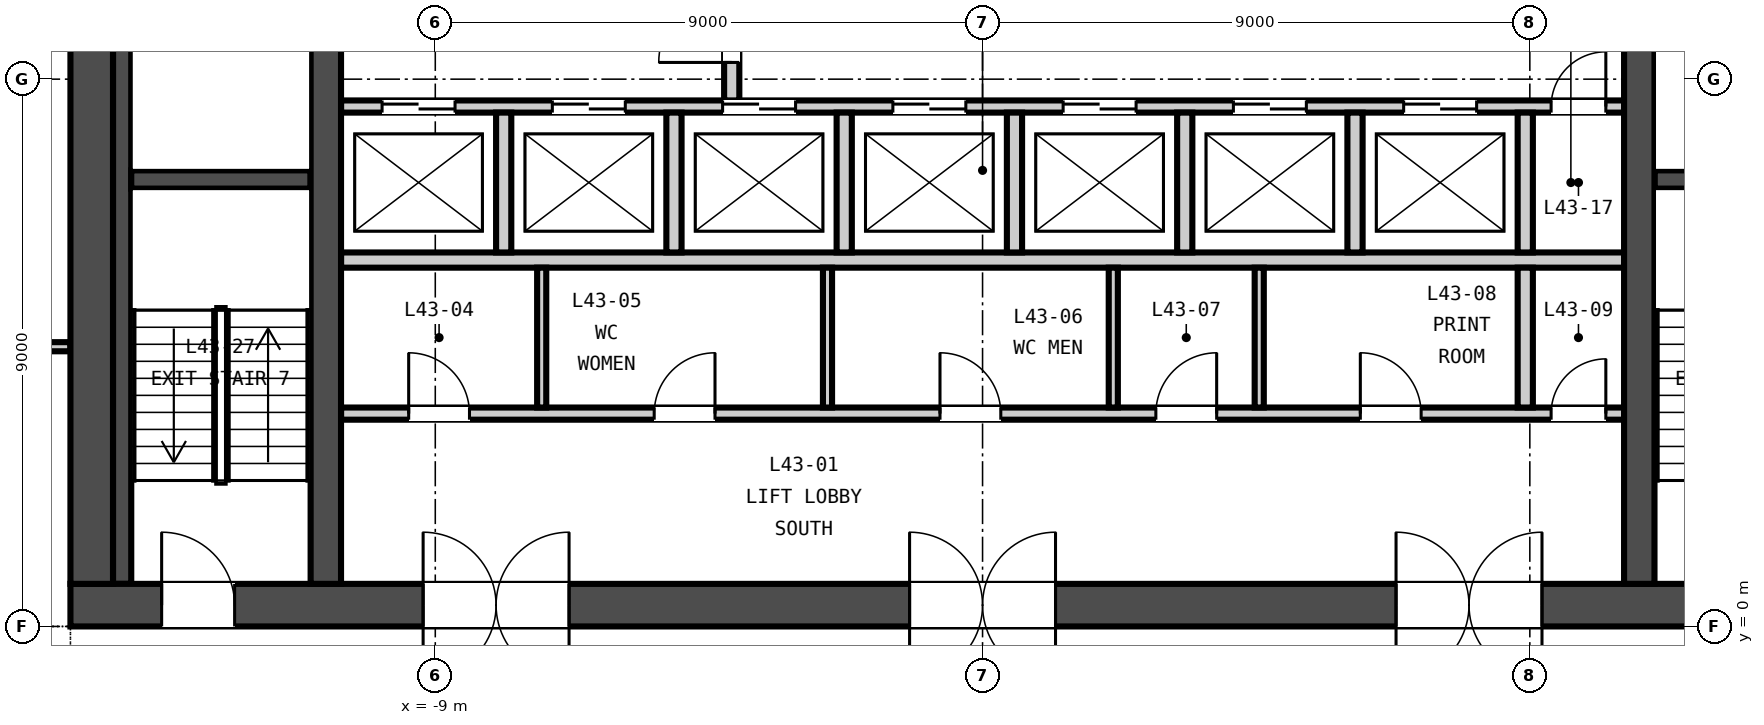
"""IFC4 building model, lengths in metres.
Left out: names, types, materials, properties, quantities, classifications, styles, units other than length and angle.
Written with IfcOpenShell. Run it as: python <this file> out.ifc"""

import sys

from ifc_helpers import new_model, si_unit, direction, frame, frame_2d, origin, place, context, subcontext, project, spatial, rectangle, extrude, element, fill, save


model = new_model("IFC4")
c1 = context("Model", 3, precision=1e-05, world=origin(), true_north=direction((0.0, 1.0)))
c2 = subcontext(c1, "Body", "Model", "MODEL_VIEW")
j1 = project(units=[si_unit("LENGTHUNIT", "METRE"), si_unit("PLANEANGLEUNIT", "RADIAN")], contexts=[c1])
p1 = place(None, origin())
s1 = spatial("IfcSite", under=j1, at=p1, CompositionType="ELEMENT")
p2 = place(p1, origin())
s2 = spatial("IfcBuilding", under=s1, at=p2, CompositionType="ELEMENT")
p3 = place(p2, frame((0.0, 0.0, 174.45)))
s3 = spatial("IfcBuildingStorey", under=s2, at=p3, CompositionType="ELEMENT", Elevation=174.45)
p4 = place(p3, frame((-15.0, 0.35, -0.15), z_axis=(0.0, 0.0, 1.0), x_axis=(1.0, 0.0, 0.0)))
e1 = element("IfcWall", 1, at=p4, inside=s3, PredefinedType="SOLIDWALL", context=c2, shape_type="SweptSolid", body=[
    extrude(rectangle(XDim=30.0, YDim=0.7, at=frame_2d((15.0, 0.0))), origin(), (0.0, 0.0, 1.0), 3.65),
])
p5 = place(p4, frame((5.8, 0.0, 0.15)))
e2 = element("IfcOpeningElement", 2, at=p5, cuts=e1, PredefinedType="OPENING", context=c2, shape_type="SweptSolid", body=[
    extrude(rectangle(XDim=2.4, YDim=2.4, at=frame_2d((1.2, 1.2))), frame((0.0, 0.36, 0.0), z_axis=(0.0, -1.0, 0.0), x_axis=(1.0, 0.0, 0.0)), (0.0, 0.0, 1.0), 0.72),
])
p6 = place(p4, frame((13.8, 0.0, 0.15)))
e3 = element("IfcOpeningElement", 3, at=p6, cuts=e1, PredefinedType="OPENING", context=c2, shape_type="SweptSolid", body=[
    extrude(rectangle(XDim=2.4, YDim=2.4, at=frame_2d((1.2, 1.2))), frame((0.0, 0.36, 0.0), z_axis=(0.0, -1.0, 0.0), x_axis=(1.0, 0.0, 0.0)), (0.0, 0.0, 1.0), 0.72),
])
p7 = place(p4, frame((21.8, 0.0, 0.15)))
e4 = element("IfcOpeningElement", 4, at=p7, cuts=e1, PredefinedType="OPENING", context=c2, shape_type="SweptSolid", body=[
    extrude(rectangle(XDim=2.4, YDim=2.4, at=frame_2d((1.2, 1.2))), frame((0.0, 0.36, 0.0), z_axis=(0.0, -1.0, 0.0), x_axis=(1.0, 0.0, 0.0)), (0.0, 0.0, 1.0), 0.72),
])
p8 = place(p4, frame((1.5, 0.0, 0.15)))
e5 = element("IfcOpeningElement", 5, at=p8, cuts=e1, PredefinedType="OPENING", context=c2, shape_type="SweptSolid", body=[
    extrude(rectangle(XDim=1.2, YDim=2.1, at=frame_2d((0.6, 1.05))), frame((0.0, 0.36, 0.0), z_axis=(0.0, -1.0, 0.0), x_axis=(1.0, 0.0, 0.0)), (0.0, 0.0, 1.0), 0.72),
])
p9 = place(p4, frame((27.3, 0.0, 0.15)))
e6 = element("IfcOpeningElement", 6, at=p9, cuts=e1, PredefinedType="OPENING", context=c2, shape_type="SweptSolid", body=[
    extrude(rectangle(XDim=1.2, YDim=2.1, at=frame_2d((0.6, 1.05))), frame((0.0, 0.36, 0.0), z_axis=(0.0, -1.0, 0.0), x_axis=(1.0, 0.0, 0.0)), (0.0, 0.0, 1.0), 0.72),
])
p10 = place(p3, frame((-14.65, 0.7, -0.15), z_axis=(0.0, 0.0, 1.0), x_axis=(0.0, 1.0, 0.0)))
e7 = element("IfcWall", 7, at=p10, inside=s3, PredefinedType="SOLIDWALL", context=c2, shape_type="SweptSolid", body=[
    extrude(rectangle(XDim=13.6, YDim=0.7, at=frame_2d((6.8, 0.0))), origin(), (0.0, 0.0, 1.0), 3.65),
])
for number, where, z_axis, x_axis in (
    (8, (-10.8, 0.7, -0.15), (0.0, 0.0, 1.0), (0.0, 1.0, 0.0)),
    (9, (10.8, 0.7, -0.15), (0.0, 0.0, 1.0), (0.0, 1.0, 0.0)),
):
    element("IfcWall", number, at=place(p3, frame(where, z_axis=z_axis, x_axis=x_axis)), inside=s3, PredefinedType="SOLIDWALL", context=c2, shape_type="SweptSolid", body=[
        extrude(rectangle(XDim=13.6, YDim=0.5, at=frame_2d((6.8, 0.0))), origin(), (0.0, 0.0, 1.0), 3.65),
    ])
p11 = place(p3, frame((-10.55, 3.5, 0.0), z_axis=(0.0, 0.0, 1.0), x_axis=(1.0, 0.0, 0.0)))
e10 = element("IfcWall", 10, at=p11, inside=s3, PredefinedType="PARTITIONING", context=c2, shape_type="SweptSolid", body=[
    extrude(rectangle(XDim=21.1, YDim=0.2, at=frame_2d((10.55, 0.0))), origin(), (0.0, 0.0, 1.0), 3.5),
])
p12 = place(p11, frame((1.113, 0.0, 0.0)))
e11 = element("IfcOpeningElement", 11, at=p12, cuts=e10, PredefinedType="OPENING", context=c2, shape_type="SweptSolid", body=[
    extrude(rectangle(XDim=1.0, YDim=2.1, at=frame_2d((0.5, 1.05))), frame((0.0, 0.11, 0.0), z_axis=(0.0, -1.0, 0.0), x_axis=(1.0, 0.0, 0.0)), (0.0, 0.0, 1.0), 0.22),
])
p13 = place(p11, frame((5.15, 0.0, 0.0)))
e12 = element("IfcOpeningElement", 12, at=p13, cuts=e10, PredefinedType="OPENING", context=c2, shape_type="SweptSolid", body=[
    extrude(rectangle(XDim=1.0, YDim=2.1, at=frame_2d((0.5, 1.05))), frame((0.0, 0.11, 0.0), z_axis=(0.0, -1.0, 0.0), x_axis=(1.0, 0.0, 0.0)), (0.0, 0.0, 1.0), 0.22),
])
p14 = place(p11, frame((9.85, 0.0, 0.0)))
e13 = element("IfcOpeningElement", 13, at=p14, cuts=e10, PredefinedType="OPENING", context=c2, shape_type="SweptSolid", body=[
    extrude(rectangle(XDim=1.0, YDim=2.1, at=frame_2d((0.5, 1.05))), frame((0.0, 0.11, 0.0), z_axis=(0.0, -1.0, 0.0), x_axis=(1.0, 0.0, 0.0)), (0.0, 0.0, 1.0), 0.22),
])
p15 = place(p11, frame((13.4, 0.0, 0.0)))
e14 = element("IfcOpeningElement", 14, at=p15, cuts=e10, PredefinedType="OPENING", context=c2, shape_type="SweptSolid", body=[
    extrude(rectangle(XDim=1.0, YDim=2.1, at=frame_2d((0.5, 1.05))), frame((0.0, 0.11, 0.0), z_axis=(0.0, -1.0, 0.0), x_axis=(1.0, 0.0, 0.0)), (0.0, 0.0, 1.0), 0.22),
])
p16 = place(p11, frame((16.762, 0.0, 0.0)))
e15 = element("IfcOpeningElement", 15, at=p16, cuts=e10, PredefinedType="OPENING", context=c2, shape_type="SweptSolid", body=[
    extrude(rectangle(XDim=1.0, YDim=2.1, at=frame_2d((0.5, 1.05))), frame((0.0, 0.11, 0.0), z_axis=(0.0, -1.0, 0.0), x_axis=(1.0, 0.0, 0.0)), (0.0, 0.0, 1.0), 0.22),
])
p17 = place(p11, frame((19.9, 0.0, 0.0)))
e16 = element("IfcOpeningElement", 16, at=p17, cuts=e10, PredefinedType="OPENING", context=c2, shape_type="SweptSolid", body=[
    extrude(rectangle(XDim=0.9, YDim=2.1, at=frame_2d((0.45, 1.05))), frame((0.0, 0.11, 0.0), z_axis=(0.0, -1.0, 0.0), x_axis=(1.0, 0.0, 0.0)), (0.0, 0.0, 1.0), 0.22),
])
p18 = place(p3, frame((-10.55, 6.025, 0.0), z_axis=(0.0, 0.0, 1.0), x_axis=(1.0, 0.0, 0.0)))
e17 = element("IfcWall", 17, at=p18, inside=s3, PredefinedType="PARTITIONING", context=c2, shape_type="SweptSolid", body=[
    extrude(rectangle(XDim=21.1, YDim=0.25, at=frame_2d((10.55, 0.0))), origin(), (0.0, 0.0, 1.0), 3.5),
])
p19 = place(p3, frame((-10.55, 8.55, 0.0), z_axis=(0.0, 0.0, 1.0), x_axis=(1.0, 0.0, 0.0)))
e18 = element("IfcWall", 18, at=p19, inside=s3, PredefinedType="PARTITIONING", context=c2, shape_type="SweptSolid", body=[
    extrude(rectangle(XDim=21.1, YDim=0.2, at=frame_2d((10.55, 0.0))), origin(), (0.0, 0.0, 1.0), 3.5),
])
p20 = place(p19, frame((0.675, 0.0, 0.0)))
e19 = element("IfcOpeningElement", 19, at=p20, cuts=e18, PredefinedType="OPENING", context=c2, shape_type="SweptSolid", body=[
    extrude(rectangle(XDim=1.2, YDim=2.1, at=frame_2d((0.6, 1.05))), frame((0.0, 0.11, 0.0), z_axis=(0.0, -1.0, 0.0), x_axis=(1.0, 0.0, 0.0)), (0.0, 0.0, 1.0), 0.22),
])
p21 = place(p19, frame((3.475, 0.0, 0.0)))
e20 = element("IfcOpeningElement", 20, at=p21, cuts=e18, PredefinedType="OPENING", context=c2, shape_type="SweptSolid", body=[
    extrude(rectangle(XDim=1.2, YDim=2.1, at=frame_2d((0.6, 1.05))), frame((0.0, 0.11, 0.0), z_axis=(0.0, -1.0, 0.0), x_axis=(1.0, 0.0, 0.0)), (0.0, 0.0, 1.0), 0.22),
])
p22 = place(p19, frame((6.275, 0.0, 0.0)))
e21 = element("IfcOpeningElement", 21, at=p22, cuts=e18, PredefinedType="OPENING", context=c2, shape_type="SweptSolid", body=[
    extrude(rectangle(XDim=1.2, YDim=2.1, at=frame_2d((0.6, 1.05))), frame((0.0, 0.11, 0.0), z_axis=(0.0, -1.0, 0.0), x_axis=(1.0, 0.0, 0.0)), (0.0, 0.0, 1.0), 0.22),
])
p23 = place(p19, frame((9.075, 0.0, 0.0)))
e22 = element("IfcOpeningElement", 22, at=p23, cuts=e18, PredefinedType="OPENING", context=c2, shape_type="SweptSolid", body=[
    extrude(rectangle(XDim=1.2, YDim=2.1, at=frame_2d((0.6, 1.05))), frame((0.0, 0.11, 0.0), z_axis=(0.0, -1.0, 0.0), x_axis=(1.0, 0.0, 0.0)), (0.0, 0.0, 1.0), 0.22),
])
p24 = place(p19, frame((11.875, 0.0, 0.0)))
e23 = element("IfcOpeningElement", 23, at=p24, cuts=e18, PredefinedType="OPENING", context=c2, shape_type="SweptSolid", body=[
    extrude(rectangle(XDim=1.2, YDim=2.1, at=frame_2d((0.6, 1.05))), frame((0.0, 0.11, 0.0), z_axis=(0.0, -1.0, 0.0), x_axis=(1.0, 0.0, 0.0)), (0.0, 0.0, 1.0), 0.22),
])
p25 = place(p19, frame((14.675, 0.0, 0.0)))
e24 = element("IfcOpeningElement", 24, at=p25, cuts=e18, PredefinedType="OPENING", context=c2, shape_type="SweptSolid", body=[
    extrude(rectangle(XDim=1.2, YDim=2.1, at=frame_2d((0.6, 1.05))), frame((0.0, 0.11, 0.0), z_axis=(0.0, -1.0, 0.0), x_axis=(1.0, 0.0, 0.0)), (0.0, 0.0, 1.0), 0.22),
])
p26 = place(p19, frame((17.475, 0.0, 0.0)))
e25 = element("IfcOpeningElement", 25, at=p26, cuts=e18, PredefinedType="OPENING", context=c2, shape_type="SweptSolid", body=[
    extrude(rectangle(XDim=1.2, YDim=2.1, at=frame_2d((0.6, 1.05))), frame((0.0, 0.11, 0.0), z_axis=(0.0, -1.0, 0.0), x_axis=(1.0, 0.0, 0.0)), (0.0, 0.0, 1.0), 0.22),
])
p27 = place(p19, frame((19.9, 0.0, 0.0)))
e26 = element("IfcOpeningElement", 26, at=p27, cuts=e18, PredefinedType="OPENING", context=c2, shape_type="SweptSolid", body=[
    extrude(rectangle(XDim=0.9, YDim=2.1, at=frame_2d((0.45, 1.05))), frame((0.0, 0.11, 0.0), z_axis=(0.0, -1.0, 0.0), x_axis=(1.0, 0.0, 0.0)), (0.0, 0.0, 1.0), 0.22),
])
p28 = place(p3, frame((-4.125, 8.65, 0.0), z_axis=(0.0, 0.0, 1.0), x_axis=(0.0, 1.0, 0.0)))
e27 = element("IfcWall", 27, at=p28, inside=s3, PredefinedType="PARTITIONING", context=c2, shape_type="SweptSolid", body=[
    extrude(rectangle(XDim=2.45, YDim=0.25, at=frame_2d((1.225, 0.0))), origin(), (0.0, 0.0, 1.0), 3.5),
])
p29 = place(p28, frame((0.625, 0.0, 0.0)))
e28 = element("IfcOpeningElement", 28, at=p29, cuts=e27, PredefinedType="OPENING", context=c2, shape_type="SweptSolid", body=[
    extrude(rectangle(XDim=1.2, YDim=2.1, at=frame_2d((0.6, 1.05))), frame((0.0, 0.135, 0.0), z_axis=(0.0, -1.0, 0.0), x_axis=(1.0, 0.0, 0.0)), (0.0, 0.0, 1.0), 0.27),
])
for number, where, z_axis, x_axis in (
    (29, (-7.25, 3.6, 0.0), (0.0, 0.0, 1.0), (0.0, 1.0, 0.0)),
    (30, (-2.55, 3.6, 0.0), (0.0, 0.0, 1.0), (0.0, 1.0, 0.0)),
    (31, (2.15, 3.6, 0.0), (0.0, 0.0, 1.0), (0.0, 1.0, 0.0)),
    (32, (4.55, 3.6, 0.0), (0.0, 0.0, 1.0), (0.0, 1.0, 0.0)),
):
    element("IfcWall", number, at=place(p3, frame(where, z_axis=z_axis, x_axis=x_axis)), inside=s3, PredefinedType="PARTITIONING", context=c2, shape_type="SweptSolid", body=[
        extrude(rectangle(XDim=2.3, YDim=0.15, at=frame_2d((1.15, 0.0))), origin(), (0.0, 0.0, 1.0), 3.5),
    ])
p30 = place(p3, frame((8.925, 3.6, 0.0), z_axis=(0.0, 0.0, 1.0), x_axis=(0.0, 1.0, 0.0)))
e33 = element("IfcWall", 33, at=p30, inside=s3, PredefinedType="PARTITIONING", context=c2, shape_type="SweptSolid", body=[
    extrude(rectangle(XDim=2.3, YDim=0.25, at=frame_2d((1.15, 0.0))), origin(), (0.0, 0.0, 1.0), 3.5),
])
for number, where, z_axis, x_axis in (
    (34, (-7.875, 6.15, 0.0), (0.0, 0.0, 1.0), (0.0, 1.0, 0.0)),
    (35, (-5.075, 6.15, 0.0), (0.0, 0.0, 1.0), (0.0, 1.0, 0.0)),
    (36, (-2.275, 6.15, 0.0), (0.0, 0.0, 1.0), (0.0, 1.0, 0.0)),
    (37, (0.525, 6.15, 0.0), (0.0, 0.0, 1.0), (0.0, 1.0, 0.0)),
    (38, (3.325, 6.15, 0.0), (0.0, 0.0, 1.0), (0.0, 1.0, 0.0)),
    (39, (6.125, 6.15, 0.0), (0.0, 0.0, 1.0), (0.0, 1.0, 0.0)),
    (40, (8.925, 6.15, 0.0), (0.0, 0.0, 1.0), (0.0, 1.0, 0.0)),
):
    element("IfcWall", number, at=place(p3, frame(where, z_axis=z_axis, x_axis=x_axis)), inside=s3, PredefinedType="PARTITIONING", context=c2, shape_type="SweptSolid", body=[
        extrude(rectangle(XDim=2.3, YDim=0.25, at=frame_2d((1.15, 0.0))), origin(), (0.0, 0.0, 1.0), 3.5),
    ])
p31 = place(p3, frame((-14.0, 7.35, 0.0), z_axis=(0.0, 0.0, 1.0), x_axis=(1.0, 0.0, 0.0)))
e41 = element("IfcWall", 41, at=p31, inside=s3, PredefinedType="SOLIDWALL", context=c2, shape_type="SweptSolid", body=[
    extrude(rectangle(XDim=2.95, YDim=0.3, at=frame_2d((1.475, 0.0))), origin(), (0.0, 0.0, 1.0), 3.5),
])
p32 = place(p3, frame((-14.15, 0.7, 0.0), z_axis=(0.0, 0.0, 1.0), x_axis=(0.0, 1.0, 0.0)))
e42 = element("IfcWall", 42, at=p32, inside=s3, PredefinedType="SOLIDWALL", context=c2, shape_type="SweptSolid", body=[
    extrude(rectangle(XDim=13.6, YDim=0.3, at=frame_2d((6.8, 0.0))), origin(), (0.0, 0.0, 1.0), 3.5),
])
p33 = place(p3, frame((11.05, 7.35, 0.0), z_axis=(0.0, 0.0, 1.0), x_axis=(1.0, 0.0, 0.0)))
e43 = element("IfcWall", 43, at=p33, inside=s3, PredefinedType="SOLIDWALL", context=c2, shape_type="SweptSolid", body=[
    extrude(rectangle(XDim=2.95, YDim=0.3, at=frame_2d((1.475, 0.0))), origin(), (0.0, 0.0, 1.0), 3.5),
])
p34 = place(p3, frame((-15.0, 14.239, 0.0), z_axis=(0.0, 0.0, 1.0), x_axis=(-0.467834708812, -0.88381597928, 0.0)))
e44 = element("IfcWall", 44, at=p34, inside=s3, PredefinedType="PARTITIONING", context=c2, shape_type="SweptSolid", body=[
    extrude(rectangle(XDim=7.406, YDim=0.15, at=frame_2d((3.703, 0.0))), origin(), (0.0, 0.0, 1.0), 2.741),
])
p35 = place(p34, frame((3.203, 0.0, 0.0)))
e45 = element("IfcOpeningElement", 45, at=p35, cuts=e44, PredefinedType="OPENING", context=c2, shape_type="SweptSolid", body=[
    extrude(rectangle(XDim=1.0, YDim=2.1, at=frame_2d((0.5, 1.05))), frame((0.0, 0.085, 0.0), z_axis=(0.0, -1.0, 0.0), x_axis=(1.0, 0.0, 0.0)), (0.0, 0.0, 1.0), 0.17),
])
p36 = place(p3, frame((-18.425, 4.6, 0.0), z_axis=(0.0, 0.0, 1.0), x_axis=(1.0, 0.0, 0.0)))
e46 = element("IfcWall", 46, at=p36, inside=s3, PredefinedType="PARTITIONING", context=c2, shape_type="SweptSolid", body=[
    extrude(rectangle(XDim=3.425, YDim=0.15, at=frame_2d((1.712, 0.0))), origin(), (0.0, 0.0, 1.0), 2.741),
])
p37 = place(p29, origin())
e47 = element("IfcDoor", 47, at=p37, inside=s3, OperationType="SINGLE_SWING_LEFT", PredefinedType="DOOR", context=c2, shape_type="SweptSolid", body=[
    extrude(rectangle(XDim=1.2, YDim=2.1, at=frame_2d((0.6, 1.05))), frame((0.0, 0.025, 0.0), z_axis=(0.0, -1.0, 0.0), x_axis=(1.0, 0.0, 0.0)), (0.0, 0.0, 1.0), 0.05),
])
fill(e28, e47)
p38 = place(p12, origin())
e48 = element("IfcDoor", 48, at=p38, inside=s3, OperationType="SINGLE_SWING_LEFT", PredefinedType="DOOR", context=c2, shape_type="SweptSolid", body=[
    extrude(rectangle(XDim=1.0, YDim=2.1, at=frame_2d((0.5, 1.05))), frame((0.0, 0.025, 0.0), z_axis=(0.0, -1.0, 0.0), x_axis=(1.0, 0.0, 0.0)), (0.0, 0.0, 1.0), 0.05),
])
fill(e11, e48)
p39 = place(p13, origin())
e49 = element("IfcDoor", 49, at=p39, inside=s3, OperationType="SINGLE_SWING_RIGHT", PredefinedType="DOOR", context=c2, shape_type="SweptSolid", body=[
    extrude(rectangle(XDim=1.0, YDim=2.1, at=frame_2d((0.5, 1.05))), frame((0.0, 0.025, 0.0), z_axis=(0.0, -1.0, 0.0), x_axis=(1.0, 0.0, 0.0)), (0.0, 0.0, 1.0), 0.05),
])
fill(e12, e49)
p40 = place(p14, origin())
e50 = element("IfcDoor", 50, at=p40, inside=s3, OperationType="SINGLE_SWING_LEFT", PredefinedType="DOOR", context=c2, shape_type="SweptSolid", body=[
    extrude(rectangle(XDim=1.0, YDim=2.1, at=frame_2d((0.5, 1.05))), frame((0.0, 0.025, 0.0), z_axis=(0.0, -1.0, 0.0), x_axis=(1.0, 0.0, 0.0)), (0.0, 0.0, 1.0), 0.05),
])
fill(e13, e50)
p41 = place(p15, origin())
e51 = element("IfcDoor", 51, at=p41, inside=s3, OperationType="SINGLE_SWING_RIGHT", PredefinedType="DOOR", context=c2, shape_type="SweptSolid", body=[
    extrude(rectangle(XDim=1.0, YDim=2.1, at=frame_2d((0.5, 1.05))), frame((0.0, 0.025, 0.0), z_axis=(0.0, -1.0, 0.0), x_axis=(1.0, 0.0, 0.0)), (0.0, 0.0, 1.0), 0.05),
])
fill(e14, e51)
p42 = place(p16, origin())
e52 = element("IfcDoor", 52, at=p42, inside=s3, OperationType="SINGLE_SWING_LEFT", PredefinedType="DOOR", context=c2, shape_type="SweptSolid", body=[
    extrude(rectangle(XDim=1.0, YDim=2.1, at=frame_2d((0.5, 1.05))), frame((0.0, 0.025, 0.0), z_axis=(0.0, -1.0, 0.0), x_axis=(1.0, 0.0, 0.0)), (0.0, 0.0, 1.0), 0.05),
])
fill(e15, e52)
p43 = place(p17, origin())
e53 = element("IfcDoor", 53, at=p43, inside=s3, OperationType="SINGLE_SWING_RIGHT", PredefinedType="DOOR", context=c2, shape_type="SweptSolid", body=[
    extrude(rectangle(XDim=0.9, YDim=2.1, at=frame_2d((0.45, 1.05))), frame((0.0, 0.025, 0.0), z_axis=(0.0, -1.0, 0.0), x_axis=(1.0, 0.0, 0.0)), (0.0, 0.0, 1.0), 0.05),
])
fill(e16, e53)
p44 = place(p20, origin())
e54 = element("IfcDoor", 54, at=p44, inside=s3, OperationType="DOUBLE_DOOR_SLIDING", PredefinedType="DOOR", context=c2, shape_type="SweptSolid", body=[
    extrude(rectangle(XDim=1.2, YDim=2.1, at=frame_2d((0.6, 1.05))), frame((0.0, 0.025, 0.0), z_axis=(0.0, -1.0, 0.0), x_axis=(1.0, 0.0, 0.0)), (0.0, 0.0, 1.0), 0.05),
])
fill(e19, e54)
p45 = place(p21, origin())
e55 = element("IfcDoor", 55, at=p45, inside=s3, OperationType="DOUBLE_DOOR_SLIDING", PredefinedType="DOOR", context=c2, shape_type="SweptSolid", body=[
    extrude(rectangle(XDim=1.2, YDim=2.1, at=frame_2d((0.6, 1.05))), frame((0.0, 0.025, 0.0), z_axis=(0.0, -1.0, 0.0), x_axis=(1.0, 0.0, 0.0)), (0.0, 0.0, 1.0), 0.05),
])
fill(e20, e55)
p46 = place(p22, origin())
e56 = element("IfcDoor", 56, at=p46, inside=s3, OperationType="DOUBLE_DOOR_SLIDING", PredefinedType="DOOR", context=c2, shape_type="SweptSolid", body=[
    extrude(rectangle(XDim=1.2, YDim=2.1, at=frame_2d((0.6, 1.05))), frame((0.0, 0.025, 0.0), z_axis=(0.0, -1.0, 0.0), x_axis=(1.0, 0.0, 0.0)), (0.0, 0.0, 1.0), 0.05),
])
fill(e21, e56)
p47 = place(p23, origin())
e57 = element("IfcDoor", 57, at=p47, inside=s3, OperationType="DOUBLE_DOOR_SLIDING", PredefinedType="DOOR", context=c2, shape_type="SweptSolid", body=[
    extrude(rectangle(XDim=1.2, YDim=2.1, at=frame_2d((0.6, 1.05))), frame((0.0, 0.025, 0.0), z_axis=(0.0, -1.0, 0.0), x_axis=(1.0, 0.0, 0.0)), (0.0, 0.0, 1.0), 0.05),
])
fill(e22, e57)
p48 = place(p24, origin())
e58 = element("IfcDoor", 58, at=p48, inside=s3, OperationType="DOUBLE_DOOR_SLIDING", PredefinedType="DOOR", context=c2, shape_type="SweptSolid", body=[
    extrude(rectangle(XDim=1.2, YDim=2.1, at=frame_2d((0.6, 1.05))), frame((0.0, 0.025, 0.0), z_axis=(0.0, -1.0, 0.0), x_axis=(1.0, 0.0, 0.0)), (0.0, 0.0, 1.0), 0.05),
])
fill(e23, e58)
p49 = place(p25, origin())
e59 = element("IfcDoor", 59, at=p49, inside=s3, OperationType="DOUBLE_DOOR_SLIDING", PredefinedType="DOOR", context=c2, shape_type="SweptSolid", body=[
    extrude(rectangle(XDim=1.2, YDim=2.1, at=frame_2d((0.6, 1.05))), frame((0.0, 0.025, 0.0), z_axis=(0.0, -1.0, 0.0), x_axis=(1.0, 0.0, 0.0)), (0.0, 0.0, 1.0), 0.05),
])
fill(e24, e59)
p50 = place(p26, origin())
e60 = element("IfcDoor", 60, at=p50, inside=s3, OperationType="DOUBLE_DOOR_SLIDING", PredefinedType="DOOR", context=c2, shape_type="SweptSolid", body=[
    extrude(rectangle(XDim=1.2, YDim=2.1, at=frame_2d((0.6, 1.05))), frame((0.0, 0.025, 0.0), z_axis=(0.0, -1.0, 0.0), x_axis=(1.0, 0.0, 0.0)), (0.0, 0.0, 1.0), 0.05),
])
fill(e25, e60)
p51 = place(p27, origin())
e61 = element("IfcDoor", 61, at=p51, inside=s3, OperationType="SINGLE_SWING_RIGHT", PredefinedType="DOOR", context=c2, shape_type="SweptSolid", body=[
    extrude(rectangle(XDim=0.9, YDim=2.1, at=frame_2d((0.45, 1.05))), frame((0.0, 0.025, 0.0), z_axis=(0.0, -1.0, 0.0), x_axis=(1.0, 0.0, 0.0)), (0.0, 0.0, 1.0), 0.05),
])
fill(e26, e61)
p52 = place(p5, origin())
e62 = element("IfcDoor", 62, at=p52, inside=s3, OperationType="DOUBLE_DOOR_DOUBLE_SWING", PredefinedType="DOOR", context=c2, shape_type="SweptSolid", body=[
    extrude(rectangle(XDim=2.4, YDim=2.4, at=frame_2d((1.2, 1.2))), frame((0.0, 0.025, 0.0), z_axis=(0.0, -1.0, 0.0), x_axis=(1.0, 0.0, 0.0)), (0.0, 0.0, 1.0), 0.05),
])
fill(e2, e62)
p53 = place(p6, origin())
e63 = element("IfcDoor", 63, at=p53, inside=s3, OperationType="DOUBLE_DOOR_DOUBLE_SWING", PredefinedType="DOOR", context=c2, shape_type="SweptSolid", body=[
    extrude(rectangle(XDim=2.4, YDim=2.4, at=frame_2d((1.2, 1.2))), frame((0.0, 0.025, 0.0), z_axis=(0.0, -1.0, 0.0), x_axis=(1.0, 0.0, 0.0)), (0.0, 0.0, 1.0), 0.05),
])
fill(e3, e63)
p54 = place(p7, origin())
e64 = element("IfcDoor", 64, at=p54, inside=s3, OperationType="DOUBLE_DOOR_DOUBLE_SWING", PredefinedType="DOOR", context=c2, shape_type="SweptSolid", body=[
    extrude(rectangle(XDim=2.4, YDim=2.4, at=frame_2d((1.2, 1.2))), frame((0.0, 0.025, 0.0), z_axis=(0.0, -1.0, 0.0), x_axis=(1.0, 0.0, 0.0)), (0.0, 0.0, 1.0), 0.05),
])
fill(e4, e64)
p55 = place(p8, origin())
e65 = element("IfcDoor", 65, at=p55, inside=s3, OperationType="SINGLE_SWING_LEFT", PredefinedType="DOOR", context=c2, shape_type="SweptSolid", body=[
    extrude(rectangle(XDim=1.2, YDim=2.1, at=frame_2d((0.6, 1.05))), frame((0.0, 0.025, 0.0), z_axis=(0.0, -1.0, 0.0), x_axis=(1.0, 0.0, 0.0)), (0.0, 0.0, 1.0), 0.05),
])
fill(e5, e65)
save(model, sys.argv[1])
